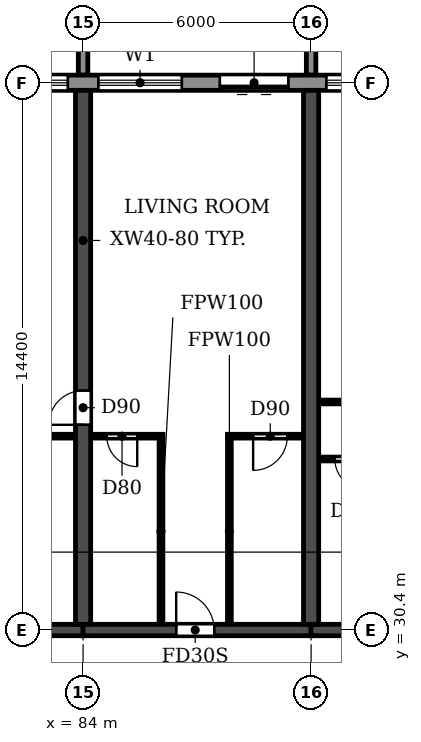
"""IFC4 building model, lengths in metres.
Left out: names, types, materials, properties, quantities, classifications, styles, units other than length and angle.
Written with IfcOpenShell. Run it as: python <this file> out.ifc"""

import sys

from ifc_helpers import new_model, si_unit, direction, frame, frame_2d, origin, place, context, subcontext, project, spatial, polyline, rectangle, outline, extrude, source, transform, mapped, element, fill, save


model = new_model("IFC4")
c1 = context("Model", 3, precision=1e-05, world=origin(), true_north=direction((0.0, 1.0)))
c2 = subcontext(c1, "Body", "Model", "MODEL_VIEW")
j1 = project(units=[si_unit("LENGTHUNIT", "METRE"), si_unit("PLANEANGLEUNIT", "RADIAN")], contexts=[c1])
p1 = place(None, origin())
s1 = spatial("IfcSite", under=j1, at=p1, CompositionType="ELEMENT")
p2 = place(p1, origin())
s2 = spatial("IfcBuilding", under=s1, at=p2, CompositionType="ELEMENT")
p3 = place(p2, frame((0.0, 0.0, 43.2)))
s3 = spatial("IfcBuildingStorey", under=s2, at=p3, CompositionType="ELEMENT", Elevation=43.2)
p4 = place(p3, frame((84.0, 30.55, 0.0), z_axis=(0.0, 0.0, 1.0), x_axis=(0.0, 1.0, 0.0)))
e1 = element("IfcWall", 1, at=p4, inside=s3, PredefinedType="SHEAR", context=c2, shape_type="SweptSolid", body=[
    extrude(rectangle(XDim=14.05, YDim=0.4, at=frame_2d((7.025, 0.0))), origin(), (0.0, 0.0, 1.0), 3.05),
])
p5 = place(p4, frame((5.25, 0.0, 0.0)))
e2 = element("IfcOpeningElement", 2, at=p5, cuts=e1, PredefinedType="OPENING", context=c2, shape_type="SweptSolid", body=[
    extrude(rectangle(XDim=0.9, YDim=2.1, at=frame_2d((0.45, 1.05))), frame((0.0, 0.21, 0.0), z_axis=(0.0, -1.0, 0.0), x_axis=(1.0, 0.0, 0.0)), (0.0, 0.0, 1.0), 0.42),
])
p6 = place(p3, frame((90.0, 30.55, 0.0), z_axis=(0.0, 0.0, 1.0), x_axis=(0.0, 1.0, 0.0)))
e3 = element("IfcWall", 3, at=p6, inside=s3, PredefinedType="SHEAR", context=c2, shape_type="SweptSolid", body=[
    extrude(rectangle(XDim=14.05, YDim=0.4, at=frame_2d((7.025, 0.0))), origin(), (0.0, 0.0, 1.0), 3.05),
])
p7 = place(p3, frame((78.0, 30.4, 0.0), z_axis=(0.0, 0.0, 1.0), x_axis=(1.0, 0.0, 0.0)))
e4 = element("IfcWall", 4, at=p7, inside=s3, PredefinedType="SHEAR", context=c2, shape_type="SweptSolid", body=[
    extrude(rectangle(XDim=6.0, YDim=0.3, at=frame_2d((3.0, 0.0))), origin(), (0.0, 0.0, 1.0), 2.45),
])
p8 = place(p3, frame((84.0, 30.4, 0.0), z_axis=(0.0, 0.0, 1.0), x_axis=(1.0, 0.0, 0.0)))
e5 = element("IfcWall", 5, at=p8, inside=s3, PredefinedType="SHEAR", context=c2, shape_type="SweptSolid", body=[
    extrude(rectangle(XDim=6.0, YDim=0.3, at=frame_2d((3.0, 0.0))), origin(), (0.0, 0.0, 1.0), 2.45),
])
p9 = place(p8, frame((2.45, 0.0, 0.0)))
e6 = element("IfcOpeningElement", 6, at=p9, cuts=e5, PredefinedType="OPENING", context=c2, shape_type="SweptSolid", body=[
    extrude(rectangle(XDim=1.0, YDim=2.1, at=frame_2d((0.5, 1.05))), frame((0.0, 0.16, 0.0), z_axis=(0.0, -1.0, 0.0), x_axis=(1.0, 0.0, 0.0)), (0.0, 0.0, 1.0), 0.32),
])
p10 = place(p3, frame((90.0, 30.4, 0.0), z_axis=(0.0, 0.0, 1.0), x_axis=(1.0, 0.0, 0.0)))
e7 = element("IfcWall", 7, at=p10, inside=s3, PredefinedType="SHEAR", context=c2, shape_type="SweptSolid", body=[
    extrude(rectangle(XDim=6.0, YDim=0.3, at=frame_2d((3.0, 0.0))), origin(), (0.0, 0.0, 1.0), 2.45),
])
p11 = place(p10, frame((2.45, 0.0, 0.0)))
e8 = element("IfcOpeningElement", 8, at=p11, cuts=e7, PredefinedType="OPENING", context=c2, shape_type="SweptSolid", body=[
    extrude(rectangle(XDim=1.0, YDim=2.1, at=frame_2d((0.5, 1.05))), frame((0.0, 0.16, 0.0), z_axis=(0.0, -1.0, 0.0), x_axis=(1.0, 0.0, 0.0)), (0.0, 0.0, 1.0), 0.32),
])
p12 = place(p3, frame((97.317, 44.8, 0.0), z_axis=(0.0, 0.0, 1.0), x_axis=(-1.0, 0.0, 0.0)))
e9 = element("IfcWall", 9, at=p12, inside=s3, PredefinedType="STANDARD", context=c2, shape_type="SweptSolid", body=[
    extrude(rectangle(XDim=92.634, YDim=0.4, at=frame_2d((46.317, 0.0))), origin(), (0.0, 0.0, 1.0), 3.05),
])
p13 = place(p12, frame((88.917, 0.0, 0.0)))
e10 = element("IfcOpeningElement", 10, at=p13, cuts=e9, PredefinedType="OPENING", context=c2, shape_type="SweptSolid", body=[
    extrude(rectangle(XDim=1.8, YDim=2.4, at=frame_2d((0.9, 1.2))), frame((0.0, 0.21, 0.0), z_axis=(0.0, -1.0, 0.0), x_axis=(1.0, 0.0, 0.0)), (0.0, 0.0, 1.0), 0.42),
])
p14 = place(p12, frame((85.717, 0.0, 0.9)))
e11 = element("IfcOpeningElement", 11, at=p14, cuts=e9, PredefinedType="OPENING", context=c2, shape_type="SweptSolid", body=[
    extrude(rectangle(XDim=2.2, YDim=1.5, at=frame_2d((1.1, 0.75))), frame((0.0, 0.21, 0.0), z_axis=(0.0, -1.0, 0.0), x_axis=(1.0, 0.0, 0.0)), (0.0, 0.0, 1.0), 0.42),
])
p15 = place(p12, frame((82.717, 0.0, 0.9)))
e12 = element("IfcOpeningElement", 12, at=p15, cuts=e9, PredefinedType="OPENING", context=c2, shape_type="SweptSolid", body=[
    extrude(rectangle(XDim=2.2, YDim=1.5, at=frame_2d((1.1, 0.75))), frame((0.0, 0.21, 0.0), z_axis=(0.0, -1.0, 0.0), x_axis=(1.0, 0.0, 0.0)), (0.0, 0.0, 1.0), 0.42),
])
p16 = place(p12, frame((79.717, 0.0, 0.9)))
e13 = element("IfcOpeningElement", 13, at=p16, cuts=e9, PredefinedType="OPENING", context=c2, shape_type="SweptSolid", body=[
    extrude(rectangle(XDim=2.2, YDim=1.5, at=frame_2d((1.1, 0.75))), frame((0.0, 0.21, 0.0), z_axis=(0.0, -1.0, 0.0), x_axis=(1.0, 0.0, 0.0)), (0.0, 0.0, 1.0), 0.42),
])
p17 = place(p12, frame((76.717, 0.0, 0.9)))
e14 = element("IfcOpeningElement", 14, at=p17, cuts=e9, PredefinedType="OPENING", context=c2, shape_type="SweptSolid", body=[
    extrude(rectangle(XDim=2.2, YDim=1.5, at=frame_2d((1.1, 0.75))), frame((0.0, 0.21, 0.0), z_axis=(0.0, -1.0, 0.0), x_axis=(1.0, 0.0, 0.0)), (0.0, 0.0, 1.0), 0.42),
])
p18 = place(p12, frame((73.917, 0.0, 0.0)))
e15 = element("IfcOpeningElement", 15, at=p18, cuts=e9, PredefinedType="OPENING", context=c2, shape_type="SweptSolid", body=[
    extrude(rectangle(XDim=1.8, YDim=2.4, at=frame_2d((0.9, 1.2))), frame((0.0, 0.21, 0.0), z_axis=(0.0, -1.0, 0.0), x_axis=(1.0, 0.0, 0.0)), (0.0, 0.0, 1.0), 0.42),
])
p19 = place(p12, frame((70.717, 0.0, 0.9)))
e16 = element("IfcOpeningElement", 16, at=p19, cuts=e9, PredefinedType="OPENING", context=c2, shape_type="SweptSolid", body=[
    extrude(rectangle(XDim=2.2, YDim=1.5, at=frame_2d((1.1, 0.75))), frame((0.0, 0.21, 0.0), z_axis=(0.0, -1.0, 0.0), x_axis=(1.0, 0.0, 0.0)), (0.0, 0.0, 1.0), 0.42),
])
p20 = place(p12, frame((67.717, 0.0, 0.9)))
e17 = element("IfcOpeningElement", 17, at=p20, cuts=e9, PredefinedType="OPENING", context=c2, shape_type="SweptSolid", body=[
    extrude(rectangle(XDim=2.2, YDim=1.5, at=frame_2d((1.1, 0.75))), frame((0.0, 0.21, 0.0), z_axis=(0.0, -1.0, 0.0), x_axis=(1.0, 0.0, 0.0)), (0.0, 0.0, 1.0), 0.42),
])
p21 = place(p12, frame((64.717, 0.0, 0.9)))
e18 = element("IfcOpeningElement", 18, at=p21, cuts=e9, PredefinedType="OPENING", context=c2, shape_type="SweptSolid", body=[
    extrude(rectangle(XDim=2.2, YDim=1.5, at=frame_2d((1.1, 0.75))), frame((0.0, 0.21, 0.0), z_axis=(0.0, -1.0, 0.0), x_axis=(1.0, 0.0, 0.0)), (0.0, 0.0, 1.0), 0.42),
])
p22 = place(p12, frame((61.917, 0.0, 0.0)))
e19 = element("IfcOpeningElement", 19, at=p22, cuts=e9, PredefinedType="OPENING", context=c2, shape_type="SweptSolid", body=[
    extrude(rectangle(XDim=1.8, YDim=2.4, at=frame_2d((0.9, 1.2))), frame((0.0, 0.21, 0.0), z_axis=(0.0, -1.0, 0.0), x_axis=(1.0, 0.0, 0.0)), (0.0, 0.0, 1.0), 0.42),
])
p23 = place(p12, frame((58.717, 0.0, 0.9)))
e20 = element("IfcOpeningElement", 20, at=p23, cuts=e9, PredefinedType="OPENING", context=c2, shape_type="SweptSolid", body=[
    extrude(rectangle(XDim=2.2, YDim=1.5, at=frame_2d((1.1, 0.75))), frame((0.0, 0.21, 0.0), z_axis=(0.0, -1.0, 0.0), x_axis=(1.0, 0.0, 0.0)), (0.0, 0.0, 1.0), 0.42),
])
p24 = place(p12, frame((55.717, 0.0, 0.9)))
e21 = element("IfcOpeningElement", 21, at=p24, cuts=e9, PredefinedType="OPENING", context=c2, shape_type="SweptSolid", body=[
    extrude(rectangle(XDim=2.2, YDim=1.5, at=frame_2d((1.1, 0.75))), frame((0.0, 0.21, 0.0), z_axis=(0.0, -1.0, 0.0), x_axis=(1.0, 0.0, 0.0)), (0.0, 0.0, 1.0), 0.42),
])
p25 = place(p12, frame((52.717, 0.0, 0.9)))
e22 = element("IfcOpeningElement", 22, at=p25, cuts=e9, PredefinedType="OPENING", context=c2, shape_type="SweptSolid", body=[
    extrude(rectangle(XDim=2.2, YDim=1.5, at=frame_2d((1.1, 0.75))), frame((0.0, 0.21, 0.0), z_axis=(0.0, -1.0, 0.0), x_axis=(1.0, 0.0, 0.0)), (0.0, 0.0, 1.0), 0.42),
])
p26 = place(p12, frame((49.917, 0.0, 0.0)))
e23 = element("IfcOpeningElement", 23, at=p26, cuts=e9, PredefinedType="OPENING", context=c2, shape_type="SweptSolid", body=[
    extrude(rectangle(XDim=1.8, YDim=2.4, at=frame_2d((0.9, 1.2))), frame((0.0, 0.21, 0.0), z_axis=(0.0, -1.0, 0.0), x_axis=(1.0, 0.0, 0.0)), (0.0, 0.0, 1.0), 0.42),
])
p27 = place(p12, frame((46.717, 0.0, 0.9)))
e24 = element("IfcOpeningElement", 24, at=p27, cuts=e9, PredefinedType="OPENING", context=c2, shape_type="SweptSolid", body=[
    extrude(rectangle(XDim=2.2, YDim=1.5, at=frame_2d((1.1, 0.75))), frame((0.0, 0.21, 0.0), z_axis=(0.0, -1.0, 0.0), x_axis=(1.0, 0.0, 0.0)), (0.0, 0.0, 1.0), 0.42),
])
p28 = place(p12, frame((43.717, 0.0, 0.9)))
e25 = element("IfcOpeningElement", 25, at=p28, cuts=e9, PredefinedType="OPENING", context=c2, shape_type="SweptSolid", body=[
    extrude(rectangle(XDim=2.2, YDim=1.5, at=frame_2d((1.1, 0.75))), frame((0.0, 0.21, 0.0), z_axis=(0.0, -1.0, 0.0), x_axis=(1.0, 0.0, 0.0)), (0.0, 0.0, 1.0), 0.42),
])
p29 = place(p12, frame((40.717, 0.0, 0.9)))
e26 = element("IfcOpeningElement", 26, at=p29, cuts=e9, PredefinedType="OPENING", context=c2, shape_type="SweptSolid", body=[
    extrude(rectangle(XDim=2.2, YDim=1.5, at=frame_2d((1.1, 0.75))), frame((0.0, 0.21, 0.0), z_axis=(0.0, -1.0, 0.0), x_axis=(1.0, 0.0, 0.0)), (0.0, 0.0, 1.0), 0.42),
])
p30 = place(p12, frame((37.917, 0.0, 0.0)))
e27 = element("IfcOpeningElement", 27, at=p30, cuts=e9, PredefinedType="OPENING", context=c2, shape_type="SweptSolid", body=[
    extrude(rectangle(XDim=1.8, YDim=2.4, at=frame_2d((0.9, 1.2))), frame((0.0, 0.21, 0.0), z_axis=(0.0, -1.0, 0.0), x_axis=(1.0, 0.0, 0.0)), (0.0, 0.0, 1.0), 0.42),
])
p31 = place(p12, frame((34.717, 0.0, 0.9)))
e28 = element("IfcOpeningElement", 28, at=p31, cuts=e9, PredefinedType="OPENING", context=c2, shape_type="SweptSolid", body=[
    extrude(rectangle(XDim=2.2, YDim=1.5, at=frame_2d((1.1, 0.75))), frame((0.0, 0.21, 0.0), z_axis=(0.0, -1.0, 0.0), x_axis=(1.0, 0.0, 0.0)), (0.0, 0.0, 1.0), 0.42),
])
p32 = place(p12, frame((31.717, 0.0, 0.9)))
e29 = element("IfcOpeningElement", 29, at=p32, cuts=e9, PredefinedType="OPENING", context=c2, shape_type="SweptSolid", body=[
    extrude(rectangle(XDim=2.2, YDim=1.5, at=frame_2d((1.1, 0.75))), frame((0.0, 0.21, 0.0), z_axis=(0.0, -1.0, 0.0), x_axis=(1.0, 0.0, 0.0)), (0.0, 0.0, 1.0), 0.42),
])
p33 = place(p12, frame((28.717, 0.0, 0.9)))
e30 = element("IfcOpeningElement", 30, at=p33, cuts=e9, PredefinedType="OPENING", context=c2, shape_type="SweptSolid", body=[
    extrude(rectangle(XDim=2.2, YDim=1.5, at=frame_2d((1.1, 0.75))), frame((0.0, 0.21, 0.0), z_axis=(0.0, -1.0, 0.0), x_axis=(1.0, 0.0, 0.0)), (0.0, 0.0, 1.0), 0.42),
])
p34 = place(p12, frame((25.917, 0.0, 0.0)))
e31 = element("IfcOpeningElement", 31, at=p34, cuts=e9, PredefinedType="OPENING", context=c2, shape_type="SweptSolid", body=[
    extrude(rectangle(XDim=1.8, YDim=2.4, at=frame_2d((0.9, 1.2))), frame((0.0, 0.21, 0.0), z_axis=(0.0, -1.0, 0.0), x_axis=(1.0, 0.0, 0.0)), (0.0, 0.0, 1.0), 0.42),
])
p35 = place(p12, frame((22.917, 0.0, 0.0)))
e32 = element("IfcOpeningElement", 32, at=p35, cuts=e9, PredefinedType="OPENING", context=c2, shape_type="SweptSolid", body=[
    extrude(rectangle(XDim=1.8, YDim=2.4, at=frame_2d((0.9, 1.2))), frame((0.0, 0.21, 0.0), z_axis=(0.0, -1.0, 0.0), x_axis=(1.0, 0.0, 0.0)), (0.0, 0.0, 1.0), 0.42),
])
p36 = place(p12, frame((19.717, 0.0, 0.9)))
e33 = element("IfcOpeningElement", 33, at=p36, cuts=e9, PredefinedType="OPENING", context=c2, shape_type="SweptSolid", body=[
    extrude(rectangle(XDim=2.2, YDim=1.5, at=frame_2d((1.1, 0.75))), frame((0.0, 0.21, 0.0), z_axis=(0.0, -1.0, 0.0), x_axis=(1.0, 0.0, 0.0)), (0.0, 0.0, 1.0), 0.42),
])
p37 = place(p12, frame((16.717, 0.0, 0.9)))
e34 = element("IfcOpeningElement", 34, at=p37, cuts=e9, PredefinedType="OPENING", context=c2, shape_type="SweptSolid", body=[
    extrude(rectangle(XDim=2.2, YDim=1.5, at=frame_2d((1.1, 0.75))), frame((0.0, 0.21, 0.0), z_axis=(0.0, -1.0, 0.0), x_axis=(1.0, 0.0, 0.0)), (0.0, 0.0, 1.0), 0.42),
])
p38 = place(p12, frame((13.717, 0.0, 0.9)))
e35 = element("IfcOpeningElement", 35, at=p38, cuts=e9, PredefinedType="OPENING", context=c2, shape_type="SweptSolid", body=[
    extrude(rectangle(XDim=2.2, YDim=1.5, at=frame_2d((1.1, 0.75))), frame((0.0, 0.21, 0.0), z_axis=(0.0, -1.0, 0.0), x_axis=(1.0, 0.0, 0.0)), (0.0, 0.0, 1.0), 0.42),
])
p39 = place(p12, frame((10.717, 0.0, 0.9)))
e36 = element("IfcOpeningElement", 36, at=p39, cuts=e9, PredefinedType="OPENING", context=c2, shape_type="SweptSolid", body=[
    extrude(rectangle(XDim=2.2, YDim=1.5, at=frame_2d((1.1, 0.75))), frame((0.0, 0.21, 0.0), z_axis=(0.0, -1.0, 0.0), x_axis=(1.0, 0.0, 0.0)), (0.0, 0.0, 1.0), 0.42),
])
p40 = place(p12, frame((7.917, 0.0, 0.0)))
e37 = element("IfcOpeningElement", 37, at=p40, cuts=e9, PredefinedType="OPENING", context=c2, shape_type="SweptSolid", body=[
    extrude(rectangle(XDim=1.8, YDim=2.4, at=frame_2d((0.9, 1.2))), frame((0.0, 0.21, 0.0), z_axis=(0.0, -1.0, 0.0), x_axis=(1.0, 0.0, 0.0)), (0.0, 0.0, 1.0), 0.42),
])
p41 = place(p12, frame((4.717, 0.0, 0.9)))
e38 = element("IfcOpeningElement", 38, at=p41, cuts=e9, PredefinedType="OPENING", context=c2, shape_type="SweptSolid", body=[
    extrude(rectangle(XDim=2.2, YDim=1.5, at=frame_2d((1.1, 0.75))), frame((0.0, 0.21, 0.0), z_axis=(0.0, -1.0, 0.0), x_axis=(1.0, 0.0, 0.0)), (0.0, 0.0, 1.0), 0.42),
])
p42 = place(p12, frame((1.917, 0.0, 0.0)))
e39 = element("IfcOpeningElement", 39, at=p42, cuts=e9, PredefinedType="OPENING", context=c2, shape_type="SweptSolid", body=[
    extrude(rectangle(XDim=1.8, YDim=2.4, at=frame_2d((0.9, 1.2))), frame((0.0, 0.21, 0.0), z_axis=(0.0, -1.0, 0.0), x_axis=(1.0, 0.0, 0.0)), (0.0, 0.0, 1.0), 0.42),
])
m1 = source(origin(), c2, "Body", "SweptSolid", [
    extrude(outline(polyline([(0.0, 0.0), (0.25, 0.0), (0.25, 3.1), (0.0, 3.1), (0.0, 0.0)])), origin(), (0.0, 0.0, 1.0), 3.1),
])
for number, where in (
    (40, (83.875, 45.0, 0.0)),
    (41, (89.875, 45.0, 0.0)),
):
    element("IfcWall", number, at=place(p3, frame(where)), inside=s3, PredefinedType="STANDARD", context=c2, shape_type="MappedRepresentation", body=[
        mapped(m1, transform((0.0, 0.0, 0.0))),
    ])
p43 = place(p3, frame((90.21, 34.9, 0.0), z_axis=(0.0, 0.0, 1.0), x_axis=(1.0, 0.0, 0.0)))
e42 = element("IfcWall", 42, at=p43, inside=s3, PredefinedType="PARTITIONING", context=c2, shape_type="SweptSolid", body=[
    extrude(rectangle(XDim=1.89, YDim=0.1, at=frame_2d((0.945, 0.0))), origin(), (0.0, 0.0, 1.0), 3.05),
])
p44 = place(p43, frame((0.415, 0.0, 0.0)))
e43 = element("IfcOpeningElement", 43, at=p44, cuts=e42, PredefinedType="OPENING", context=c2, shape_type="SweptSolid", body=[
    extrude(rectangle(XDim=0.8, YDim=2.1, at=frame_2d((0.4, 1.05))), frame((0.0, 0.06, 0.0), z_axis=(0.0, -1.0, 0.0), x_axis=(1.0, 0.0, 0.0)), (0.0, 0.0, 1.0), 0.12),
])
p45 = place(p3, frame((81.1, 35.5, 0.0), z_axis=(0.0, 0.0, 1.0), x_axis=(1.0, 0.0, 0.0)))
e44 = element("IfcWall", 44, at=p45, inside=s3, PredefinedType="PARTITIONING", context=c2, shape_type="SweptSolid", body=[
    extrude(rectangle(XDim=2.69, YDim=0.1, at=frame_2d((1.345, 0.0))), origin(), (0.0, 0.0, 1.0), 3.05),
])
p46 = place(p45, frame((1.0, 0.0, 0.0)))
e45 = element("IfcOpeningElement", 45, at=p46, cuts=e44, PredefinedType="OPENING", context=c2, shape_type="SweptSolid", body=[
    extrude(rectangle(XDim=0.8, YDim=2.1, at=frame_2d((0.4, 1.05))), frame((0.0, 0.06, 0.0), z_axis=(0.0, -1.0, 0.0), x_axis=(1.0, 0.0, 0.0)), (0.0, 0.0, 1.0), 0.12),
])
p47 = place(p3, frame((84.21, 35.5, 0.0), z_axis=(0.0, 0.0, 1.0), x_axis=(1.0, 0.0, 0.0)))
e46 = element("IfcWall", 46, at=p47, inside=s3, PredefinedType="PARTITIONING", context=c2, shape_type="SweptSolid", body=[
    extrude(rectangle(XDim=1.89, YDim=0.1, at=frame_2d((0.945, 0.0))), origin(), (0.0, 0.0, 1.0), 3.05),
])
p48 = place(p47, frame((0.415, 0.0, 0.0)))
e47 = element("IfcOpeningElement", 47, at=p48, cuts=e46, PredefinedType="OPENING", context=c2, shape_type="SweptSolid", body=[
    extrude(rectangle(XDim=0.8, YDim=2.1, at=frame_2d((0.4, 1.05))), frame((0.0, 0.06, 0.0), z_axis=(0.0, -1.0, 0.0), x_axis=(1.0, 0.0, 0.0)), (0.0, 0.0, 1.0), 0.12),
])
p49 = place(p3, frame((87.8, 35.5, 0.0), z_axis=(0.0, 0.0, 1.0), x_axis=(1.0, 0.0, 0.0)))
e48 = element("IfcWall", 48, at=p49, inside=s3, PredefinedType="PARTITIONING", context=c2, shape_type="SweptSolid", body=[
    extrude(rectangle(XDim=1.99, YDim=0.1, at=frame_2d((0.995, 0.0))), origin(), (0.0, 0.0, 1.0), 3.05),
])
p50 = place(p49, frame((0.675, 0.0, 0.0)))
e49 = element("IfcOpeningElement", 49, at=p50, cuts=e48, PredefinedType="OPENING", context=c2, shape_type="SweptSolid", body=[
    extrude(rectangle(XDim=0.9, YDim=2.1, at=frame_2d((0.45, 1.05))), frame((0.0, 0.06, 0.0), z_axis=(0.0, -1.0, 0.0), x_axis=(1.0, 0.0, 0.0)), (0.0, 0.0, 1.0), 0.12),
])
p51 = place(p3, frame((90.21, 36.4, 0.0), z_axis=(0.0, 0.0, 1.0), x_axis=(1.0, 0.0, 0.0)))
e50 = element("IfcWall", 50, at=p51, inside=s3, PredefinedType="PARTITIONING", context=c2, shape_type="SweptSolid", body=[
    extrude(rectangle(XDim=2.84, YDim=0.1, at=frame_2d((1.42, 0.0))), origin(), (0.0, 0.0, 1.0), 3.05),
])
p52 = place(p51, frame((1.39, 0.0, 0.0)))
e51 = element("IfcOpeningElement", 51, at=p52, cuts=e50, PredefinedType="OPENING", context=c2, shape_type="SweptSolid", body=[
    extrude(rectangle(XDim=0.9, YDim=2.1, at=frame_2d((0.45, 1.05))), frame((0.0, 0.06, 0.0), z_axis=(0.0, -1.0, 0.0), x_axis=(1.0, 0.0, 0.0)), (0.0, 0.0, 1.0), 0.12),
])
for number, where, z_axis, x_axis in (
    (52, (86.05, 30.56, 0.0), (0.0, 0.0, 1.0), (0.0, 1.0, 0.0)),
    (53, (87.85, 30.56, 0.0), (0.0, 0.0, 1.0), (0.0, 1.0, 0.0)),
):
    element("IfcWall", number, at=place(p3, frame(where, z_axis=z_axis, x_axis=x_axis)), inside=s3, PredefinedType="PARTITIONING", context=c2, shape_type="SweptSolid", body=[
        extrude(rectangle(XDim=4.89, YDim=0.1, at=frame_2d((2.445, 0.0))), origin(), (0.0, 0.0, 1.0), 3.05),
    ])
p53 = place(p38, origin())
e54 = element("IfcWindow", 54, at=p53, inside=s3, PartitioningType="DOUBLE_PANEL_HORIZONTAL", PredefinedType="WINDOW", context=c2, shape_type="SweptSolid", body=[
    extrude(rectangle(XDim=2.2, YDim=1.5, at=frame_2d((1.1, 0.75))), frame((0.0, 0.03, 0.0), z_axis=(0.0, -1.0, 0.0), x_axis=(1.0, 0.0, 0.0)), (0.0, 0.0, 1.0), 0.06),
])
fill(e35, e54)
p54 = place(p39, origin())
e55 = element("IfcWindow", 55, at=p54, inside=s3, PartitioningType="DOUBLE_PANEL_HORIZONTAL", PredefinedType="WINDOW", context=c2, shape_type="SweptSolid", body=[
    extrude(rectangle(XDim=2.2, YDim=1.5, at=frame_2d((1.1, 0.75))), frame((0.0, 0.03, 0.0), z_axis=(0.0, -1.0, 0.0), x_axis=(1.0, 0.0, 0.0)), (0.0, 0.0, 1.0), 0.06),
])
fill(e36, e55)
p55 = place(p40, origin())
e56 = element("IfcDoor", 56, at=p55, inside=s3, OperationType="DOUBLE_DOOR_SLIDING", PredefinedType="DOOR", context=c2, shape_type="SweptSolid", body=[
    extrude(rectangle(XDim=1.8, YDim=2.4, at=frame_2d((0.9, 1.2))), frame((0.0, 0.025, 0.0), z_axis=(0.0, -1.0, 0.0), x_axis=(1.0, 0.0, 0.0)), (0.0, 0.0, 1.0), 0.05),
])
fill(e37, e56)
p56 = place(p41, origin())
e57 = element("IfcWindow", 57, at=p56, inside=s3, PartitioningType="DOUBLE_PANEL_HORIZONTAL", PredefinedType="WINDOW", context=c2, shape_type="SweptSolid", body=[
    extrude(rectangle(XDim=2.2, YDim=1.5, at=frame_2d((1.1, 0.75))), frame((0.0, 0.03, 0.0), z_axis=(0.0, -1.0, 0.0), x_axis=(1.0, 0.0, 0.0)), (0.0, 0.0, 1.0), 0.06),
])
fill(e38, e57)
p57 = place(p5, origin())
e58 = element("IfcDoor", 58, at=p57, inside=s3, OperationType="SINGLE_SWING_LEFT", PredefinedType="DOOR", context=c2, shape_type="SweptSolid", body=[
    extrude(rectangle(XDim=0.9, YDim=2.1, at=frame_2d((0.45, 1.05))), frame((0.0, 0.025, 0.0), z_axis=(0.0, -1.0, 0.0), x_axis=(1.0, 0.0, 0.0)), (0.0, 0.0, 1.0), 0.05),
])
fill(e2, e58)
p58 = place(p48, frame((0.8, 0.0, 0.0), z_axis=(0.0, 0.0, 1.0), x_axis=(-1.0, 0.0, 0.0)))
e59 = element("IfcDoor", 59, at=p58, inside=s3, OperationType="SINGLE_SWING_LEFT", PredefinedType="DOOR", context=c2, shape_type="SweptSolid", body=[
    extrude(rectangle(XDim=0.8, YDim=2.1, at=frame_2d((0.4, 1.05))), frame((0.0, 0.025, 0.0), z_axis=(0.0, -1.0, 0.0), x_axis=(1.0, 0.0, 0.0)), (0.0, 0.0, 1.0), 0.05),
])
fill(e47, e59)
p59 = place(p9, origin())
e60 = element("IfcDoor", 60, at=p59, inside=s3, OperationType="SINGLE_SWING_LEFT", PredefinedType="DOOR", context=c2, shape_type="SweptSolid", body=[
    extrude(rectangle(XDim=1.0, YDim=2.1, at=frame_2d((0.5, 1.05))), frame((0.0, 0.025, 0.0), z_axis=(0.0, -1.0, 0.0), x_axis=(1.0, 0.0, 0.0)), (0.0, 0.0, 1.0), 0.05),
])
fill(e6, e60)
p60 = place(p50, frame((0.9, 0.0, 0.0), z_axis=(0.0, 0.0, 1.0), x_axis=(-1.0, 0.0, 0.0)))
e61 = element("IfcDoor", 61, at=p60, inside=s3, OperationType="SINGLE_SWING_RIGHT", PredefinedType="DOOR", context=c2, shape_type="SweptSolid", body=[
    extrude(rectangle(XDim=0.9, YDim=2.1, at=frame_2d((0.45, 1.05))), frame((0.0, 0.025, 0.0), z_axis=(0.0, -1.0, 0.0), x_axis=(1.0, 0.0, 0.0)), (0.0, 0.0, 1.0), 0.05),
])
fill(e49, e61)
p61 = place(p44, frame((0.8, 0.0, 0.0), z_axis=(0.0, 0.0, 1.0), x_axis=(-1.0, 0.0, 0.0)))
e62 = element("IfcDoor", 62, at=p61, inside=s3, OperationType="SINGLE_SWING_LEFT", PredefinedType="DOOR", context=c2, shape_type="SweptSolid", body=[
    extrude(rectangle(XDim=0.8, YDim=2.1, at=frame_2d((0.4, 1.05))), frame((0.0, 0.025, 0.0), z_axis=(0.0, -1.0, 0.0), x_axis=(1.0, 0.0, 0.0)), (0.0, 0.0, 1.0), 0.05),
])
fill(e43, e62)
save(model, sys.argv[1])
